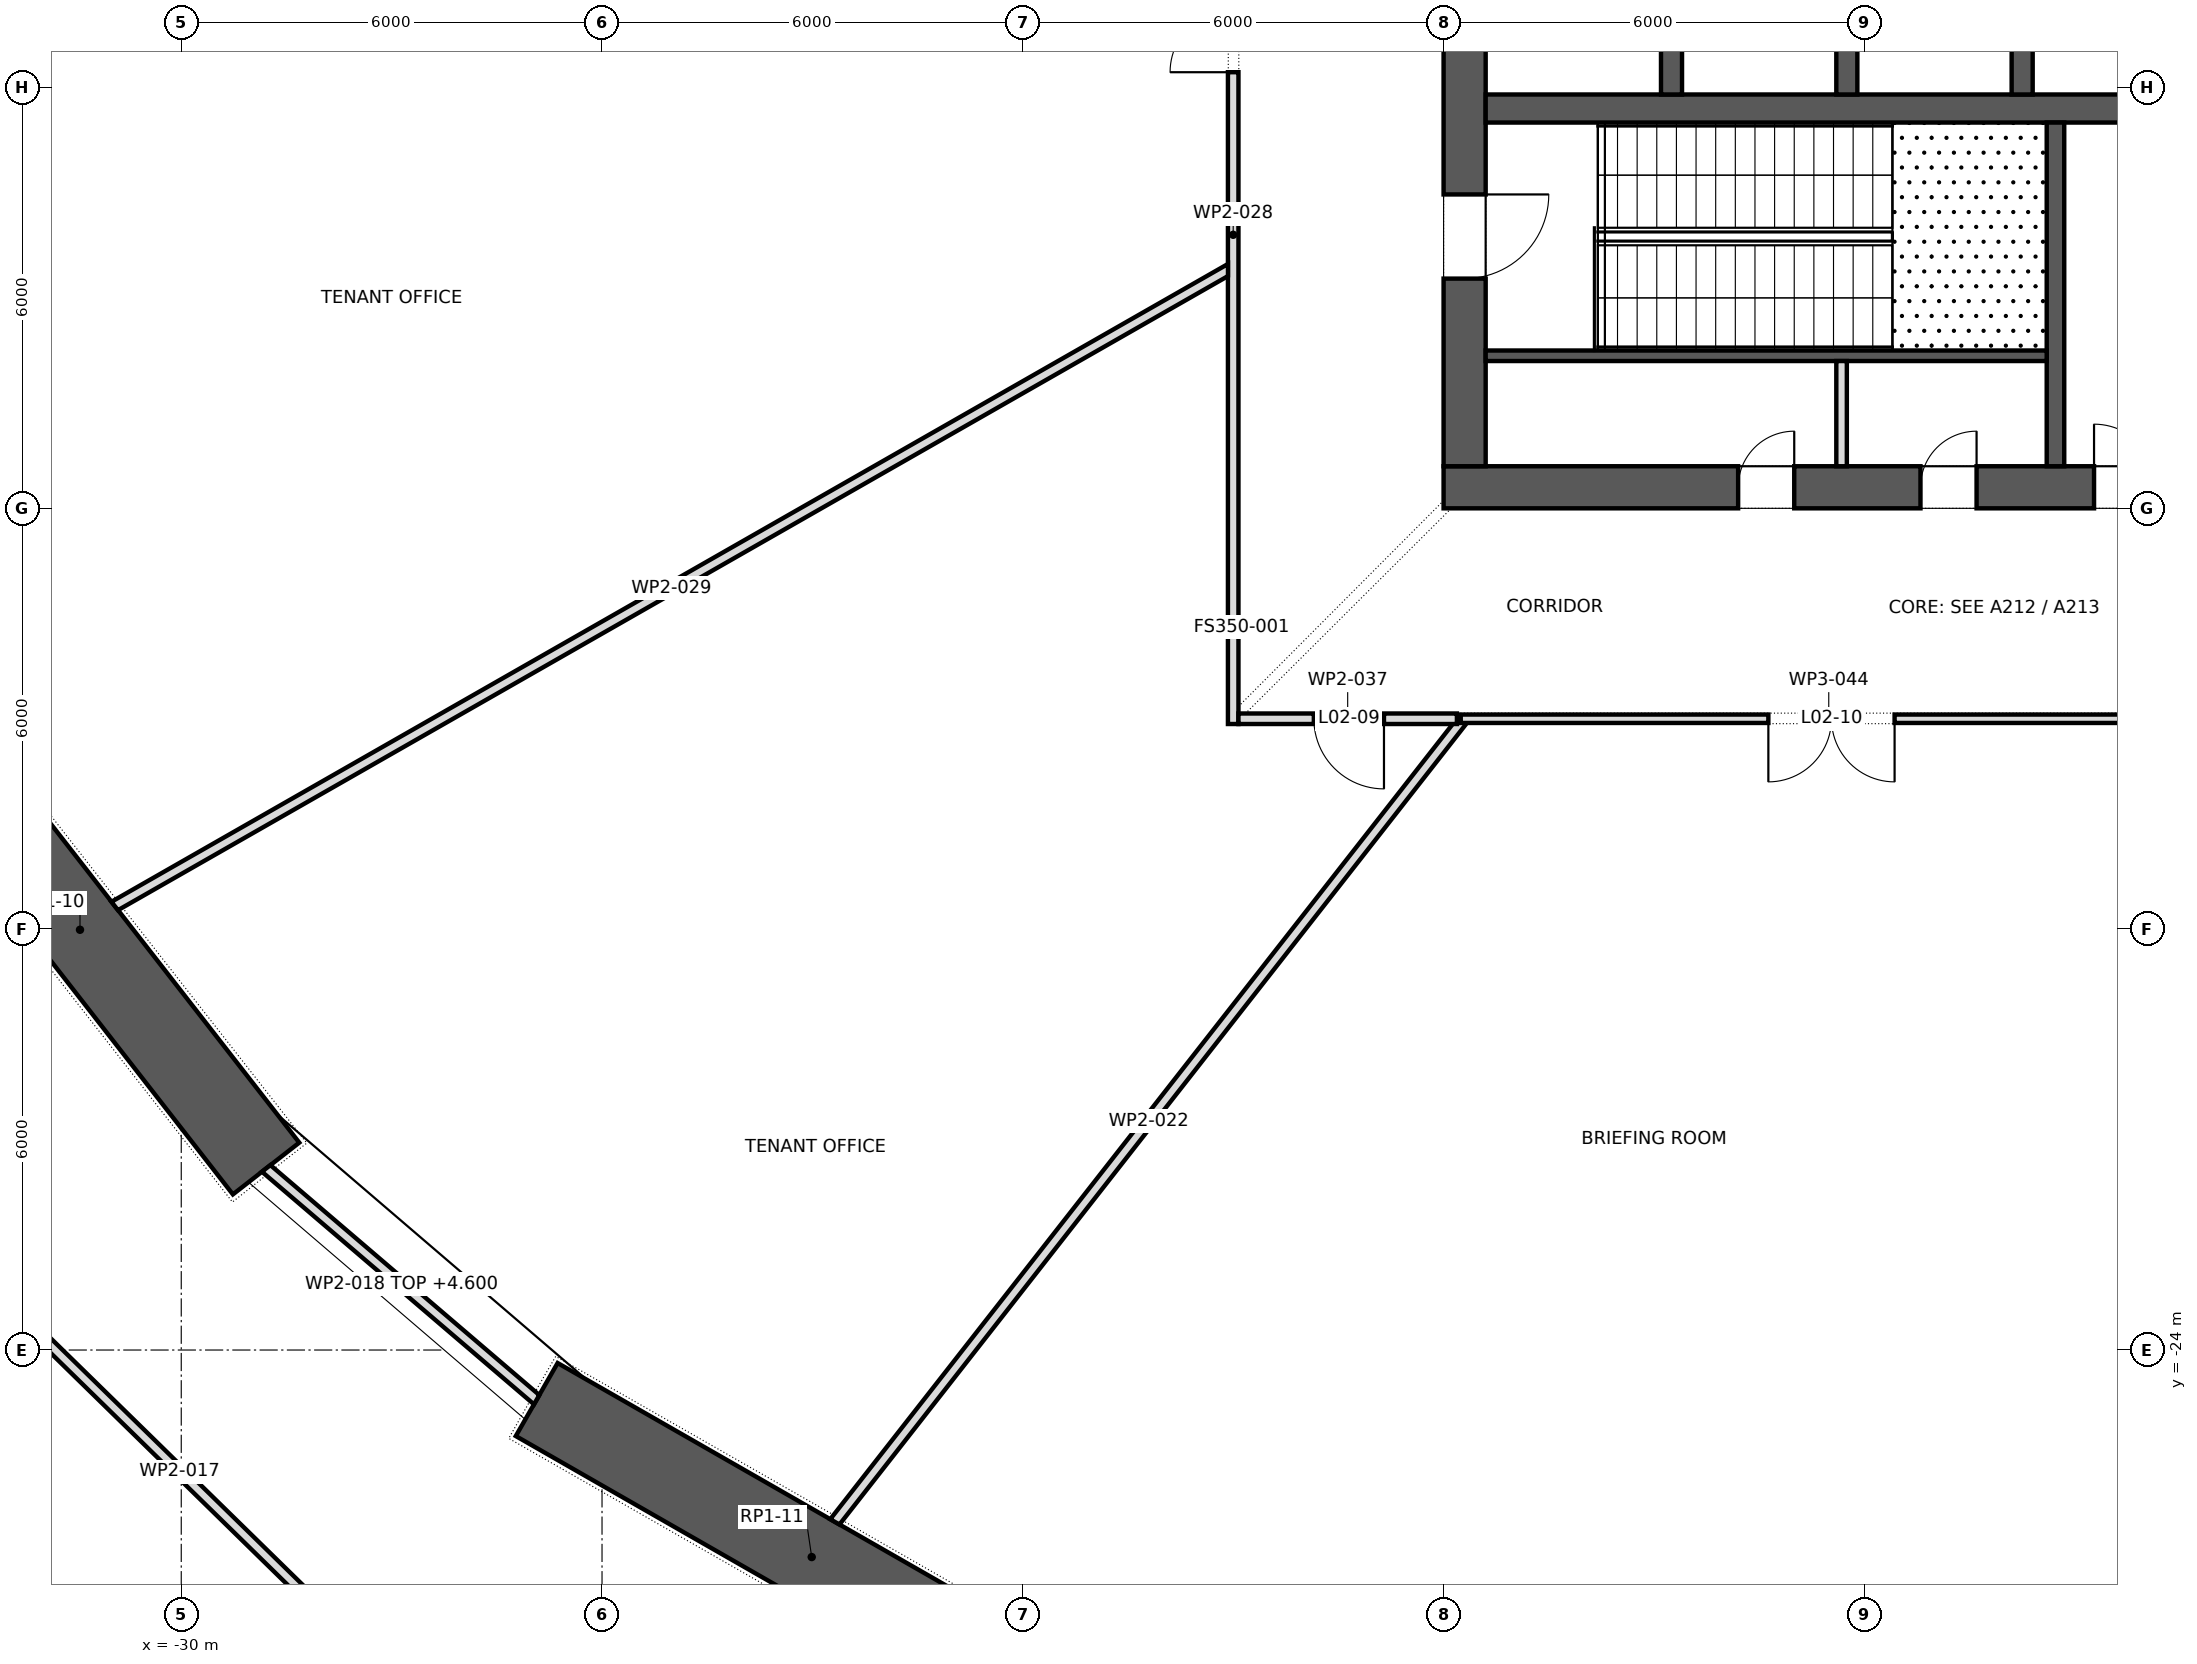
"""IFC4 building model, lengths in metres.
Left out: names, types, materials, properties, quantities, classifications, styles, units other than length and angle.
Written with IfcOpenShell. Run it as: python <this file> out.ifc"""

import sys

from ifc_helpers import new_model, si_unit, direction, frame, frame_2d, origin, place, context, subcontext, project, spatial, polyline, rectangle, outline, extrude, element, fill, save


model = new_model("IFC4")
c1 = context("Model", 3, precision=1e-05, world=origin(), true_north=direction((0.0, 1.0)))
c2 = subcontext(c1, "Body", "Model", "MODEL_VIEW")
j1 = project(units=[si_unit("LENGTHUNIT", "METRE"), si_unit("PLANEANGLEUNIT", "RADIAN")], contexts=[c1])
p1 = place(None, origin())
s1 = spatial("IfcSite", under=j1, at=p1, CompositionType="ELEMENT")
p2 = place(p1, origin())
s2 = spatial("IfcBuilding", under=s1, at=p2, CompositionType="ELEMENT")
p3 = place(p2, frame((0.0, 0.0, 12.5)))
s3 = spatial("IfcBuildingStorey", under=s2, at=p3, CompositionType="ELEMENT", Elevation=12.5)
p4 = place(p3, frame((-34.097, -14.605, 0.0), z_axis=(0.0, 0.0, 1.0), x_axis=(0.614825322247, -0.788663314174, 0.0)))
e1 = element("IfcWall", 1, at=p4, inside=s3, PredefinedType="SHEAR", context=c2, shape_type="SweptSolid", body=[
    extrude(rectangle(XDim=8.632, YDim=1.2, at=frame_2d((4.316, 0.0))), origin(), (0.0, 0.0, 1.0), 5.5),
])
p5 = place(p3, frame((-24.931, -24.706, 0.0), z_axis=(0.0, 0.0, 1.0), x_axis=(0.867760656864, -0.496982336103, 0.0)))
e2 = element("IfcWall", 2, at=p5, inside=s3, PredefinedType="SHEAR", context=c2, shape_type="SweptSolid", body=[
    extrude(rectangle(XDim=9.038, YDim=1.2, at=frame_2d((4.519, 0.0))), origin(), (0.0, 0.0, 1.0), 5.5),
])
p6 = place(p3, frame((-12.0, -11.7, 0.0), z_axis=(0.0, 0.0, 1.0), x_axis=(1.0, 0.0, 0.0)))
e3 = element("IfcWall", 3, at=p6, inside=s3, PredefinedType="SHEAR", context=c2, shape_type="SweptSolid", body=[
    extrude(rectangle(XDim=24.0, YDim=0.6, at=frame_2d((12.0, 0.0))), origin(), (0.0, 0.0, 1.0), 5.5),
])
p7 = place(p6, frame((9.275, 0.0, 0.0)))
e4 = element("IfcOpeningElement", 4, at=p7, cuts=e3, PredefinedType="OPENING", context=c2, shape_type="SweptSolid", body=[
    extrude(rectangle(XDim=0.9, YDim=2.1, at=frame_2d((0.45, 1.05))), frame((0.0, 0.312, 0.0), z_axis=(0.0, -1.0, 0.0), x_axis=(1.0, 0.0, 0.0)), (0.0, 0.0, 1.0), 0.624),
])
p8 = place(p6, frame((10.925, 0.0, 0.0)))
e5 = element("IfcOpeningElement", 5, at=p8, cuts=e3, PredefinedType="OPENING", context=c2, shape_type="SweptSolid", body=[
    extrude(rectangle(XDim=0.9, YDim=2.1, at=frame_2d((0.45, 1.05))), frame((0.0, 0.312, 0.0), z_axis=(0.0, -1.0, 0.0), x_axis=(1.0, 0.0, 0.0)), (0.0, 0.0, 1.0), 0.624),
])
p9 = place(p6, frame((4.2, 0.0, 0.0)))
e6 = element("IfcOpeningElement", 6, at=p9, cuts=e3, PredefinedType="OPENING", context=c2, shape_type="SweptSolid", body=[
    extrude(rectangle(XDim=0.8, YDim=2.1, at=frame_2d((0.4, 1.05))), frame((0.0, 0.312, 0.0), z_axis=(0.0, -1.0, 0.0), x_axis=(1.0, 0.0, 0.0)), (0.0, 0.0, 1.0), 0.624),
])
p10 = place(p6, frame((6.8, 0.0, 0.0)))
e7 = element("IfcOpeningElement", 7, at=p10, cuts=e3, PredefinedType="OPENING", context=c2, shape_type="SweptSolid", body=[
    extrude(rectangle(XDim=0.8, YDim=2.1, at=frame_2d((0.4, 1.05))), frame((0.0, 0.312, 0.0), z_axis=(0.0, -1.0, 0.0), x_axis=(1.0, 0.0, 0.0)), (0.0, 0.0, 1.0), 0.624),
])
p11 = place(p6, frame((13.8, 0.0, 0.0)))
e8 = element("IfcOpeningElement", 8, at=p11, cuts=e3, PredefinedType="OPENING", context=c2, shape_type="SweptSolid", body=[
    extrude(rectangle(XDim=0.8, YDim=2.1, at=frame_2d((0.4, 1.05))), frame((0.0, 0.312, 0.0), z_axis=(0.0, -1.0, 0.0), x_axis=(1.0, 0.0, 0.0)), (0.0, 0.0, 1.0), 0.624),
])
p12 = place(p6, frame((16.6, 0.0, 0.0)))
e9 = element("IfcOpeningElement", 9, at=p12, cuts=e3, PredefinedType="OPENING", context=c2, shape_type="SweptSolid", body=[
    extrude(rectangle(XDim=0.8, YDim=2.1, at=frame_2d((0.4, 1.05))), frame((0.0, 0.312, 0.0), z_axis=(0.0, -1.0, 0.0), x_axis=(1.0, 0.0, 0.0)), (0.0, 0.0, 1.0), 0.624),
])
p13 = place(p3, frame((-11.7, -11.4, 0.0), z_axis=(0.0, 0.0, 1.0), x_axis=(0.0, 1.0, 0.0)))
e10 = element("IfcWall", 10, at=p13, inside=s3, PredefinedType="SHEAR", context=c2, shape_type="SweptSolid", body=[
    extrude(rectangle(XDim=22.8, YDim=0.6, at=frame_2d((11.4, 0.0))), origin(), (0.0, 0.0, 1.0), 5.5),
])
p14 = place(p13, frame((10.2, 0.0, 0.0)))
e11 = element("IfcOpeningElement", 11, at=p14, cuts=e10, PredefinedType="OPENING", context=c2, shape_type="SweptSolid", body=[
    extrude(rectangle(XDim=2.4, YDim=2.1, at=frame_2d((1.2, 1.05))), frame((0.0, 0.312, 0.0), z_axis=(0.0, -1.0, 0.0), x_axis=(1.0, 0.0, 0.0)), (0.0, 0.0, 1.0), 0.624),
])
p15 = place(p13, frame((18.925, 0.0, 0.0)))
e12 = element("IfcOpeningElement", 12, at=p15, cuts=e10, PredefinedType="OPENING", context=c2, shape_type="SweptSolid", body=[
    extrude(rectangle(XDim=1.2, YDim=2.1, at=frame_2d((0.6, 1.05))), frame((0.0, 0.312, 0.0), z_axis=(0.0, -1.0, 0.0), x_axis=(1.0, 0.0, 0.0)), (0.0, 0.0, 1.0), 0.624),
])
p16 = place(p13, frame((2.675, 0.0, 0.0)))
e13 = element("IfcOpeningElement", 13, at=p16, cuts=e10, PredefinedType="OPENING", context=c2, shape_type="SweptSolid", body=[
    extrude(rectangle(XDim=1.2, YDim=2.1, at=frame_2d((0.6, 1.05))), frame((0.0, 0.312, 0.0), z_axis=(0.0, -1.0, 0.0), x_axis=(1.0, 0.0, 0.0)), (0.0, 0.0, 1.0), 0.624),
])
p17 = place(p3, frame((-11.4, -6.3, 0.0), z_axis=(0.0, 0.0, 1.0), x_axis=(1.0, 0.0, 0.0)))
e14 = element("IfcWall", 14, at=p17, inside=s3, PredefinedType="SHEAR", context=c2, shape_type="SweptSolid", body=[
    extrude(rectangle(XDim=22.8, YDim=0.4, at=frame_2d((11.4, 0.0))), origin(), (0.0, 0.0, 1.0), 5.5),
])
p18 = place(p17, frame((20.85, 0.0, 0.0)))
e15 = element("IfcOpeningElement", 15, at=p18, cuts=e14, PredefinedType="OPENING", context=c2, shape_type="SweptSolid", body=[
    extrude(rectangle(XDim=1.1, YDim=2.1, at=frame_2d((0.55, 1.05))), frame((0.0, 0.212, 0.0), z_axis=(0.0, -1.0, 0.0), x_axis=(1.0, 0.0, 0.0)), (0.0, 0.0, 1.0), 0.424),
])
for number, where, z_axis, x_axis in (
    (16, (-8.75, -6.1, 0.0), (0.0, 0.0, 1.0), (0.0, 1.0, 0.0)),
    (17, (-6.25, -6.1, 0.0), (0.0, 0.0, 1.0), (0.0, 1.0, 0.0)),
    (18, (-3.75, -6.1, 0.0), (0.0, 0.0, 1.0), (0.0, 1.0, 0.0)),
):
    element("IfcWall", number, at=place(p3, frame(where, z_axis=z_axis, x_axis=x_axis)), inside=s3, PredefinedType="SHEAR", context=c2, shape_type="SweptSolid", body=[
        extrude(rectangle(XDim=2.9, YDim=0.3, at=frame_2d((1.45, 0.0))), origin(), (0.0, 0.0, 1.0), 5.5),
    ])
p19 = place(p3, frame((-3.275, -11.4, 0.0), z_axis=(0.0, 0.0, 1.0), x_axis=(0.0, 1.0, 0.0)))
e19 = element("IfcWall", 19, at=p19, inside=s3, PredefinedType="SHEAR", context=c2, shape_type="SweptSolid", body=[
    extrude(rectangle(XDim=4.9, YDim=0.25, at=frame_2d((2.45, 0.0))), origin(), (0.0, 0.0, 1.0), 5.15),
])
p20 = place(p3, frame((-11.4, -9.825, 0.0), z_axis=(0.0, 0.0, 1.0), x_axis=(1.0, 0.0, 0.0)))
e20 = element("IfcWall", 20, at=p20, inside=s3, PredefinedType="SHEAR", context=c2, shape_type="SweptSolid", body=[
    extrude(rectangle(XDim=8.0, YDim=0.15, at=frame_2d((4.0, 0.0))), origin(), (0.0, 0.0, 1.0), 5.15),
])
p21 = place(p3, frame((-6.325, -11.4, 0.0), z_axis=(0.0, 0.0, 1.0), x_axis=(0.0, 1.0, 0.0)))
e21 = element("IfcWall", 21, at=p21, inside=s3, PredefinedType="PARTITIONING", context=c2, shape_type="SweptSolid", body=[
    extrude(rectangle(XDim=1.5, YDim=0.15, at=frame_2d((0.75, 0.0))), origin(), (0.0, 0.0, 1.0), 5.15),
])
p22 = place(p3, frame((-31.9, -23.9, 0.0), z_axis=(0.0, 0.0, 1.0), x_axis=(0.714809256367, -0.699319474212, 0.0)))
e22 = element("IfcWall", 22, at=p22, inside=s3, PredefinedType="PARTITIONING", context=c2, shape_type="SweptSolid", body=[
    extrude(rectangle(XDim=5.249, YDim=0.15, at=frame_2d((2.624, 0.0))), origin(), (0.0, 0.0, 1.0), 5.15),
])
p23 = place(p3, frame((-28.789, -21.411, 0.0), z_axis=(0.0, 0.0, 1.0), x_axis=(0.760084552743, -0.649824185978, 0.0)))
e23 = element("IfcWall", 23, at=p23, inside=s3, PredefinedType="PARTITIONING", context=c2, shape_type="SweptSolid", body=[
    extrude(outline(polyline([(-0.015, -0.075), (5.089, -0.075), (5.061, 0.075), (0.015, 0.075), (-0.015, -0.075)])), origin(), (0.0, 0.0, 1.0), 4.6),
])
p24 = place(p3, frame((-20.68, -26.45, 0.0), z_axis=(0.0, 0.0, 1.0), x_axis=(0.616461511357, 0.787385042413, 0.0)))
e24 = element("IfcWall", 24, at=p24, inside=s3, PredefinedType="PARTITIONING", context=c2, shape_type="SweptSolid", body=[
    extrude(outline(polyline([(0.011, -0.075), (14.518, -0.075), (14.518, 0.075), (-0.011, 0.075), (0.011, -0.075)])), origin(), (0.0, 0.0, 1.0), 5.15),
])
p25 = place(p3, frame((-15.0, -15.075, 0.0), z_axis=(0.0, 0.0, 1.0), x_axis=(0.0, 1.0, 0.0)))
e25 = element("IfcWall", 25, at=p25, inside=s3, PredefinedType="PARTITIONING", context=c2, shape_type="SweptSolid", body=[
    extrude(rectangle(XDim=13.95, YDim=0.15, at=frame_2d((6.975, 0.0))), origin(), (0.0, 0.0, 1.0), 5.15),
])
p26 = place(p25, frame((9.293, 0.0, 0.0)))
e26 = element("IfcOpeningElement", 26, at=p26, cuts=e25, PredefinedType="OPENING", context=c2, shape_type="SweptSolid", body=[
    extrude(rectangle(XDim=1.8, YDim=2.1, at=frame_2d((0.9, 1.05))), frame((0.0, 0.087, 0.0), z_axis=(0.0, -1.0, 0.0), x_axis=(1.0, 0.0, 0.0)), (0.0, 0.0, 1.0), 0.174),
])
p27 = place(p3, frame((-15.074, -8.602, 0.0), z_axis=(0.0, 0.0, 1.0), x_axis=(-0.868343386691, -0.495963469209, 0.0)))
e27 = element("IfcWall", 27, at=p27, inside=s3, PredefinedType="PARTITIONING", context=c2, shape_type="SweptSolid", body=[
    extrude(outline(polyline([(-0.043, -0.075), (18.292, -0.075), (18.271, 0.075), (0.043, 0.075), (-0.043, -0.075)])), origin(), (0.0, 0.0, 1.0), 5.15),
])
p28 = place(p3, frame((-11.81, -15.0, 0.0), z_axis=(0.0, 0.0, 1.0), x_axis=(-1.0, 0.0, 0.0)))
e28 = element("IfcWall", 28, at=p28, inside=s3, PredefinedType="PARTITIONING", context=c2, shape_type="SweptSolid", body=[
    extrude(rectangle(XDim=3.115, YDim=0.15, at=frame_2d((1.558, 0.0))), origin(), (0.0, 0.0, 1.0), 5.15),
])
p29 = place(p28, frame((1.04, 0.0, 0.0)))
e29 = element("IfcOpeningElement", 29, at=p29, cuts=e28, PredefinedType="OPENING", context=c2, shape_type="SweptSolid", body=[
    extrude(rectangle(XDim=1.0, YDim=2.1, at=frame_2d((0.5, 1.05))), frame((0.0, 0.087, 0.0), z_axis=(0.0, -1.0, 0.0), x_axis=(1.0, 0.0, 0.0)), (0.0, 0.0, 1.0), 0.174),
])
p30 = place(p3, frame((-1.26, -15.0, 0.0), z_axis=(0.0, 0.0, 1.0), x_axis=(-1.0, 0.0, 0.0)))
e30 = element("IfcWall", 30, at=p30, inside=s3, PredefinedType="PARTITIONING", context=c2, shape_type="SweptSolid", body=[
    extrude(rectangle(XDim=10.496, YDim=0.12, at=frame_2d((5.248, 0.0))), origin(), (0.0, 0.0, 1.0), 5.15),
])
p31 = place(p30, frame((4.309, 0.0, 0.0)))
e31 = element("IfcOpeningElement", 31, at=p31, cuts=e30, PredefinedType="OPENING", context=c2, shape_type="SweptSolid", body=[
    extrude(rectangle(XDim=1.8, YDim=2.1, at=frame_2d((0.9, 1.05))), frame((0.0, 0.072, 0.0), z_axis=(0.0, -1.0, 0.0), x_axis=(1.0, 0.0, 0.0)), (0.0, 0.0, 1.0), 0.144),
])
p32 = place(p16, frame((1.2, 0.0, 0.0), z_axis=(0.0, 0.0, 1.0), x_axis=(-1.0, 0.0, 0.0)))
e32 = element("IfcDoor", 32, at=p32, inside=s3, OperationType="SINGLE_SWING_RIGHT", PredefinedType="DOOR", context=c2, shape_type="SweptSolid", body=[
    extrude(rectangle(XDim=1.2, YDim=2.1, at=frame_2d((0.6, 1.05))), frame((0.0, 0.025, 0.0), z_axis=(0.0, -1.0, 0.0), x_axis=(1.0, 0.0, 0.0)), (0.0, 0.0, 1.0), 0.05),
])
fill(e13, e32)
p33 = place(p7, origin())
e33 = element("IfcDoor", 33, at=p33, inside=s3, OperationType="SINGLE_SWING_RIGHT", PredefinedType="DOOR", context=c2, shape_type="SweptSolid", body=[
    extrude(rectangle(XDim=0.9, YDim=2.1, at=frame_2d((0.45, 1.05))), frame((0.0, 0.025, 0.0), z_axis=(0.0, -1.0, 0.0), x_axis=(1.0, 0.0, 0.0)), (0.0, 0.0, 1.0), 0.05),
])
fill(e4, e33)
p34 = place(p9, origin())
e34 = element("IfcDoor", 34, at=p34, inside=s3, OperationType="SINGLE_SWING_LEFT", PredefinedType="DOOR", context=c2, shape_type="SweptSolid", body=[
    extrude(rectangle(XDim=0.8, YDim=2.1, at=frame_2d((0.4, 1.05))), frame((0.0, 0.025, 0.0), z_axis=(0.0, -1.0, 0.0), x_axis=(1.0, 0.0, 0.0)), (0.0, 0.0, 1.0), 0.05),
])
fill(e6, e34)
p35 = place(p10, origin())
e35 = element("IfcDoor", 35, at=p35, inside=s3, OperationType="SINGLE_SWING_LEFT", PredefinedType="DOOR", context=c2, shape_type="SweptSolid", body=[
    extrude(rectangle(XDim=0.8, YDim=2.1, at=frame_2d((0.4, 1.05))), frame((0.0, 0.025, 0.0), z_axis=(0.0, -1.0, 0.0), x_axis=(1.0, 0.0, 0.0)), (0.0, 0.0, 1.0), 0.05),
])
fill(e7, e35)
p36 = place(p26, origin())
e36 = element("IfcDoor", 36, at=p36, inside=s3, OperationType="DOUBLE_DOOR_SINGLE_SWING", PredefinedType="DOOR", context=c2, shape_type="SweptSolid", body=[
    extrude(rectangle(XDim=1.8, YDim=2.1, at=frame_2d((0.9, 1.05))), frame((0.0, 0.025, 0.0), z_axis=(0.0, -1.0, 0.0), x_axis=(1.0, 0.0, 0.0)), (0.0, 0.0, 1.0), 0.05),
])
fill(e26, e36)
p37 = place(p29, origin())
e37 = element("IfcDoor", 37, at=p37, inside=s3, OperationType="SINGLE_SWING_RIGHT", PredefinedType="DOOR", context=c2, shape_type="SweptSolid", body=[
    extrude(rectangle(XDim=1.0, YDim=2.1, at=frame_2d((0.5, 1.05))), frame((0.0, 0.025, 0.0), z_axis=(0.0, -1.0, 0.0), x_axis=(1.0, 0.0, 0.0)), (0.0, 0.0, 1.0), 0.05),
])
fill(e29, e37)
p38 = place(p31, origin())
e38 = element("IfcDoor", 38, at=p38, inside=s3, OperationType="DOUBLE_DOOR_SINGLE_SWING", PredefinedType="DOOR", context=c2, shape_type="SweptSolid", body=[
    extrude(rectangle(XDim=1.8, YDim=2.1, at=frame_2d((0.9, 1.05))), frame((0.0, 0.025, 0.0), z_axis=(0.0, -1.0, 0.0), x_axis=(1.0, 0.0, 0.0)), (0.0, 0.0, 1.0), 0.05),
])
fill(e31, e38)
save(model, sys.argv[1])
